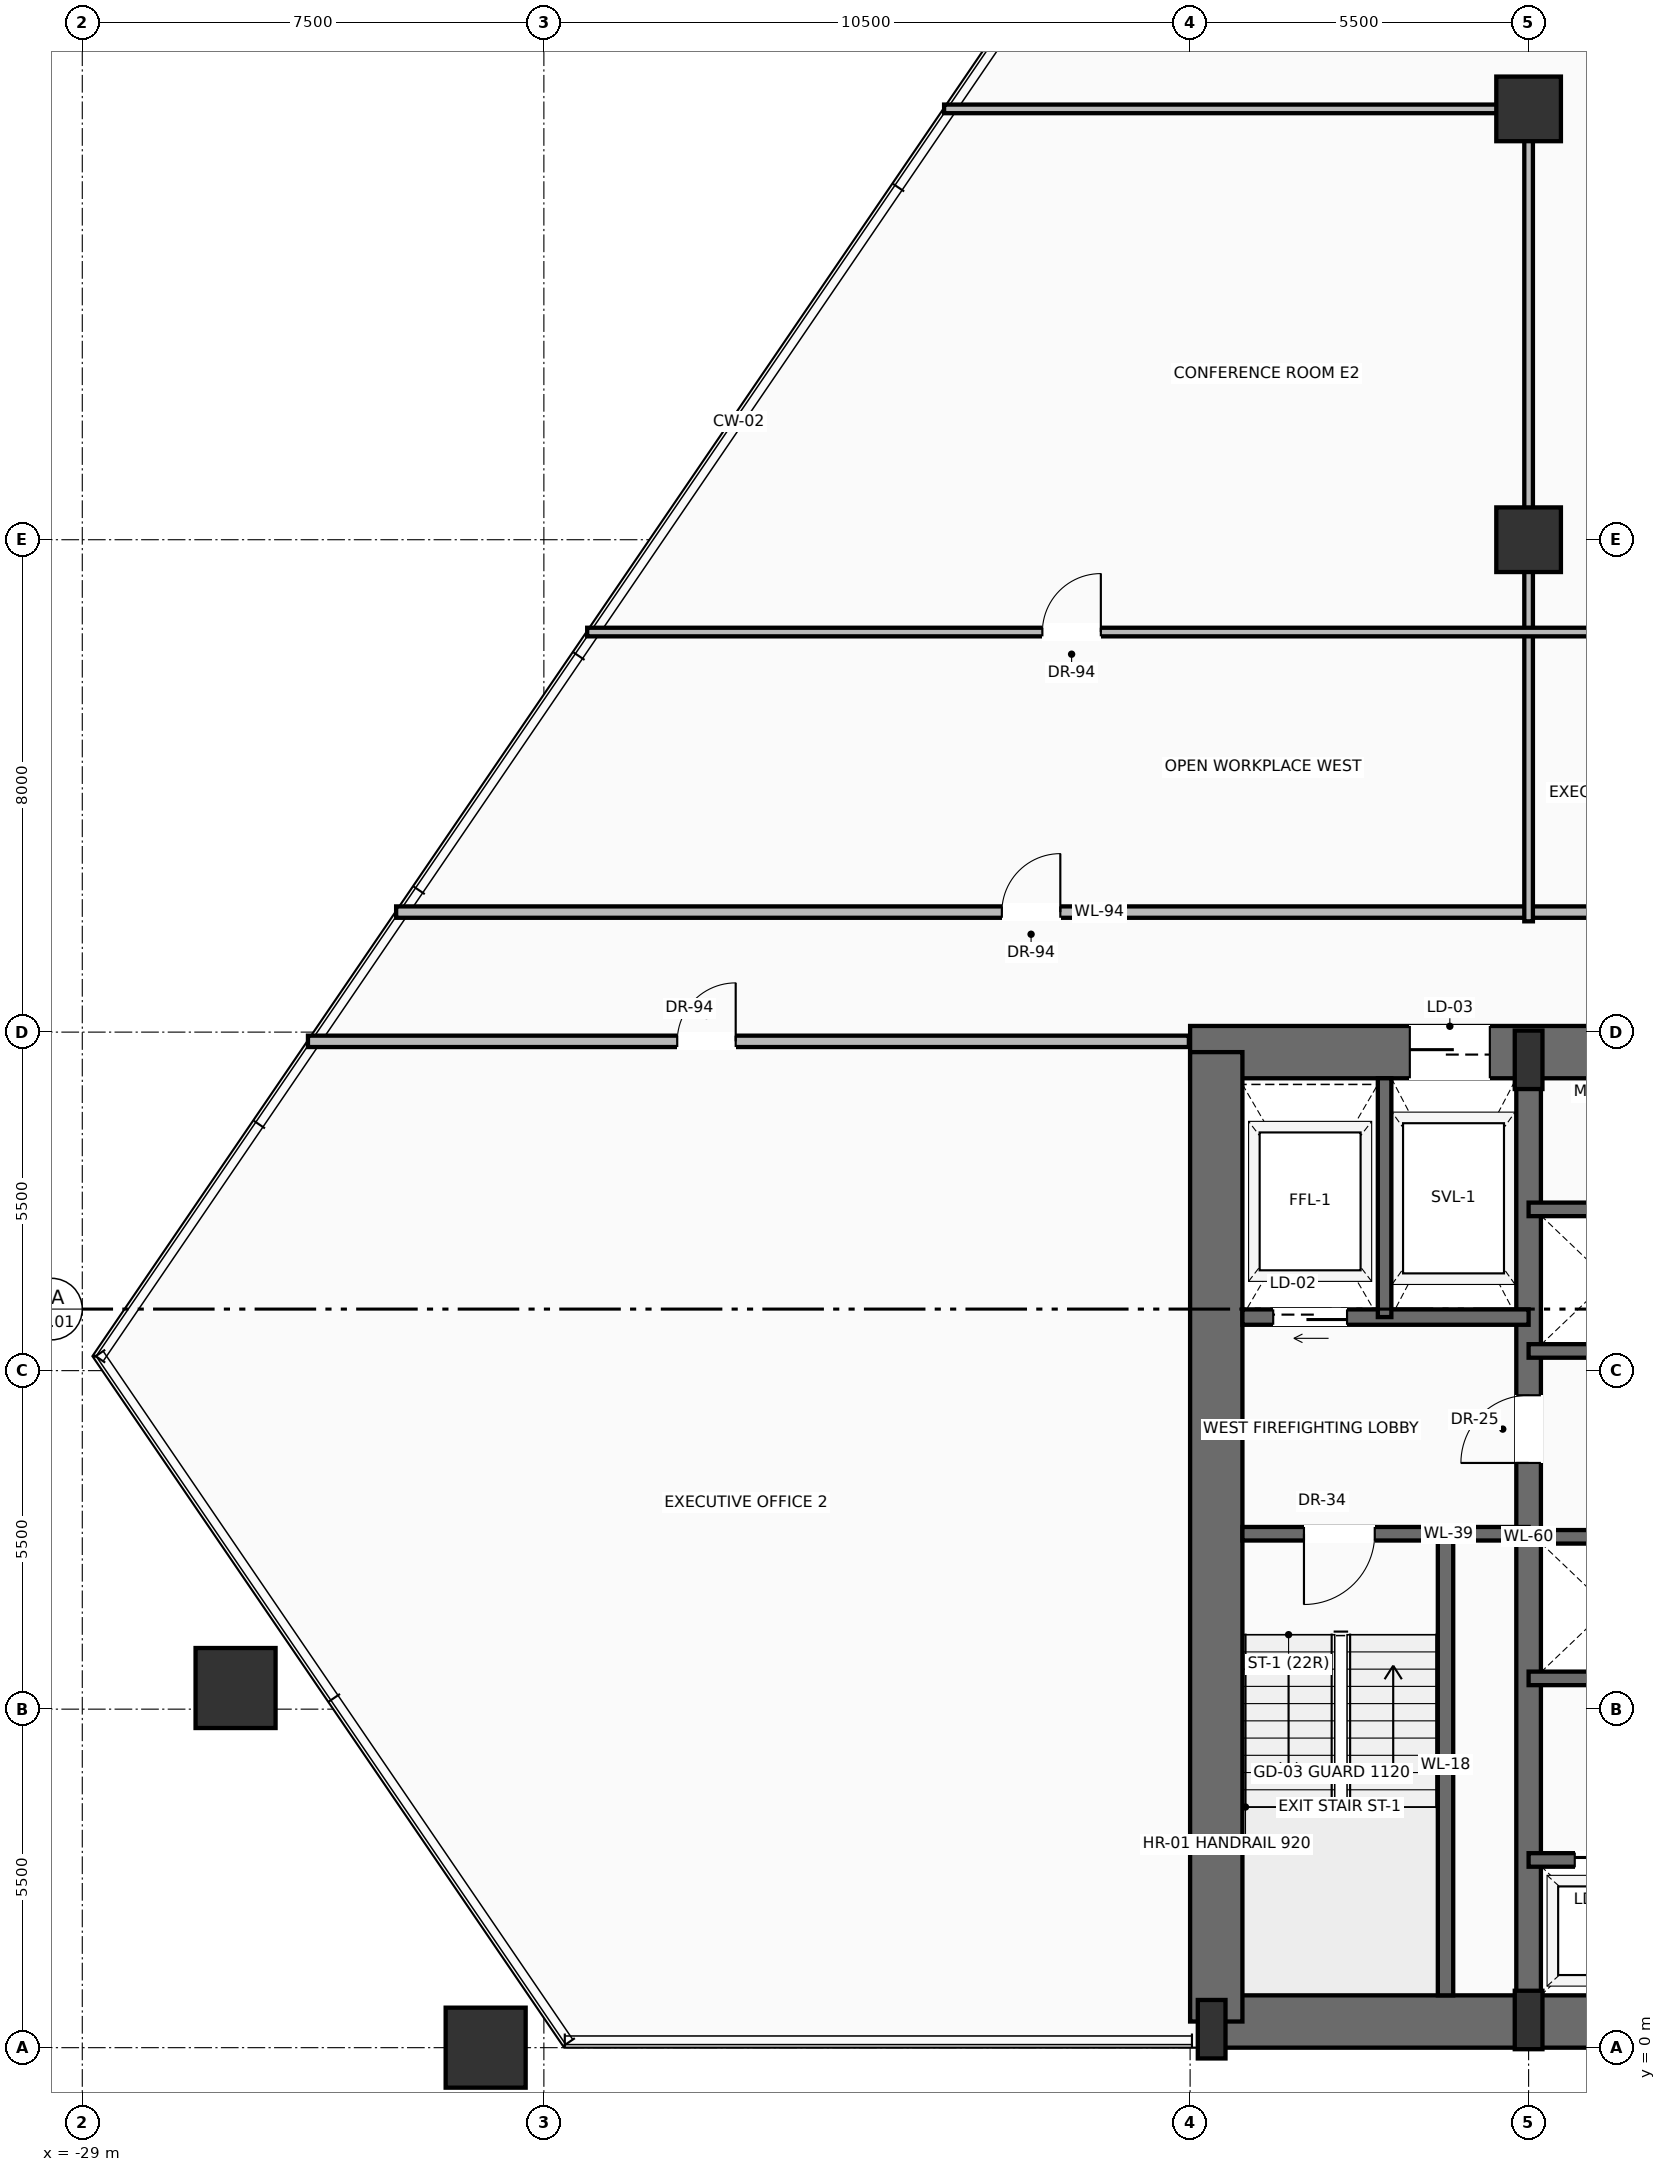
"""IFC4 building model, lengths in metres.
Left out: names, types, materials, properties, quantities, classifications, styles, units other than length and angle.
Written with IfcOpenShell. Run it as: python <this file> out.ifc"""

import sys

from ifc_helpers import new_model, si_unit, direction, frame, frame_2d, origin, origin_2d, place, context, subcontext, project, spatial, rectangle, hollow_rectangle, extrude, source, transform, mapped, element, fill, save


model = new_model("IFC4")
c1 = context("Model", 3, precision=1e-05, world=origin(), true_north=direction((0.0, 1.0)))
c2 = subcontext(c1, "Body", "Model", "MODEL_VIEW")
j1 = project(units=[si_unit("LENGTHUNIT", "METRE"), si_unit("PLANEANGLEUNIT", "RADIAN")], contexts=[c1])
p1 = place(None, origin())
s1 = spatial("IfcSite", under=j1, at=p1, CompositionType="ELEMENT")
p2 = place(p1, origin())
s2 = spatial("IfcBuilding", under=s1, at=p2, CompositionType="ELEMENT")
p3 = place(p2, frame((0.0, 0.0, 27.5)))
s3 = spatial("IfcBuildingStorey", under=s2, at=p3, CompositionType="ELEMENT", Elevation=27.5)
p4 = place(p3, frame((-10.65, 0.425, 0.0), z_axis=(0.0, 0.0, 1.0), x_axis=(1.0, 0.0, 0.0)))
e1 = element("IfcWall", 1, at=p4, inside=s3, PredefinedType="SHEAR", context=c2, shape_type="SweptSolid", body=[
    extrude(rectangle(XDim=21.3, YDim=0.85, at=frame_2d((10.65, 0.0))), origin(), (0.0, 0.0, 1.0), 3.45),
])
p5 = place(p3, frame((-11.0, 16.175, 0.0), z_axis=(0.0, 0.0, 1.0), x_axis=(1.0, 0.0, 0.0)))
e2 = element("IfcWall", 2, at=p5, inside=s3, PredefinedType="SHEAR", context=c2, shape_type="SweptSolid", body=[
    extrude(rectangle(XDim=22.0, YDim=0.85, at=frame_2d((11.0, 0.0))), origin(), (0.0, 0.0, 1.0), 3.45),
])
p6 = place(p5, frame((3.57, 0.0, 0.0)))
e3 = element("IfcOpeningElement", 3, at=p6, cuts=e2, PredefinedType="OPENING", context=c2, shape_type="SweptSolid", body=[
    extrude(rectangle(XDim=1.3, YDim=2.3, at=frame_2d((0.65, 1.15))), frame((0.0, 0.435, 0.0), z_axis=(0.0, -1.0, 0.0), x_axis=(1.0, 0.0, 0.0)), (0.0, 0.0, 1.0), 0.87),
])
p7 = place(p5, frame((10.0, 0.0, 0.0)))
e4 = element("IfcOpeningElement", 4, at=p7, cuts=e2, PredefinedType="OPENING", context=c2, shape_type="SweptSolid", body=[
    extrude(rectangle(XDim=2.0, YDim=2.4, at=frame_2d((1.0, 1.2))), frame((0.0, 0.435, 0.0), z_axis=(0.0, -1.0, 0.0), x_axis=(1.0, 0.0, 0.0)), (0.0, 0.0, 1.0), 0.87),
])
p8 = place(p3, frame((-10.575, 0.425, 0.0), z_axis=(0.0, 0.0, 1.0), x_axis=(0.0, 1.0, 0.0)))
e5 = element("IfcWall", 5, at=p8, inside=s3, PredefinedType="SHEAR", context=c2, shape_type="SweptSolid", body=[
    extrude(rectangle(XDim=15.75, YDim=0.85, at=frame_2d((7.875, 0.0))), origin(), (0.0, 0.0, 1.0), 3.45),
])
p9 = place(p3, frame((-5.5, 0.425, 0.0), z_axis=(0.0, 0.0, 1.0), x_axis=(0.0, 1.0, 0.0)))
e6 = element("IfcWall", 6, at=p9, inside=s3, PredefinedType="SHEAR", context=c2, shape_type="SweptSolid", body=[
    extrude(rectangle(XDim=15.75, YDim=0.4, at=frame_2d((7.875, 0.0))), origin(), (0.0, 0.0, 1.0), 3.45),
])
p10 = place(p9, frame((9.075, 0.0, 0.0)))
e7 = element("IfcOpeningElement", 7, at=p10, cuts=e6, PredefinedType="OPENING", context=c2, shape_type="SweptSolid", body=[
    extrude(rectangle(XDim=1.1, YDim=2.2, at=frame_2d((0.55, 1.1))), frame((0.0, 0.21, 0.0), z_axis=(0.0, -1.0, 0.0), x_axis=(1.0, 0.0, 0.0)), (0.0, 0.0, 1.0), 0.42),
])
m1 = source(origin(), c2, "Body", "SweptSolid", [
    extrude(rectangle(XDim=0.45, YDim=0.95, at=origin_2d()), origin(), (0.0, 0.0, 1.0), 3.7),
])
for number, where, z_axis, x_axis in (
    (8, (-10.65, 0.3, 0.0), (0.0, 0.0, 1.0), (1.0, 0.0, 0.0)),
    (9, (-5.5, 0.45, 0.0), (0.0, 0.0, 1.0), (1.0, 0.0, 0.0)),
    (10, (-5.5, 16.05, 0.0), (0.0, 0.0, 1.0), (1.0, 0.0, 0.0)),
):
    element("IfcColumn", number, at=place(p3, frame(where, z_axis=z_axis, x_axis=x_axis)), inside=s3, PredefinedType="PILASTER", context=c2, shape_type="MappedRepresentation", body=[
        mapped(m1, transform((0.0, 0.0, 0.0), scale=1.0)),
    ])
m2 = source(origin(), c2, "Body", "SweptSolid", [
    extrude(hollow_rectangle(XDim=1.3, YDim=1.3, WallThickness=0.065, at=origin_2d()), origin(), (0.0, 0.0, 1.0), 3.692),
])
for number, where, z_axis, x_axis in (
    (11, (-22.446, 0.0, 0.004), (-0.02, 0.0, 1.0), (0.0, -1.0, 0.0)),
    (12, (-26.51, 5.843, 0.004), (-0.004, -0.018, 1.0), (0.976, -0.216, 0.0)),
):
    element("IfcColumn", number, at=place(p3, frame(where, z_axis=z_axis, x_axis=x_axis)), inside=s3, PredefinedType="COLUMN", context=c2, shape_type="MappedRepresentation", body=[
        mapped(m2, transform((0.0, 0.0, 0.0), scale=1.0)),
    ])
m3 = source(origin(), c2, "Body", "SweptSolid", [
    extrude(rectangle(XDim=1.05, YDim=1.05, at=origin_2d()), origin(), (0.0, 0.0, 1.0), 3.7),
])
for number, where, z_axis, x_axis in (
    (13, (-5.5, 24.5, 0.0), (0.0, 0.0, 1.0), (1.0, 0.0, 0.0)),
    (14, (-5.5, 31.5, 0.0), (0.0, 0.0, 1.0), (1.0, 0.0, 0.0)),
):
    element("IfcColumn", number, at=place(p3, frame(where, z_axis=z_axis, x_axis=x_axis)), inside=s3, PredefinedType="COLUMN", context=c2, shape_type="MappedRepresentation", body=[
        mapped(m3, transform((0.0, 0.0, 0.0), scale=1.0)),
    ])
p11 = place(p3, frame((-6.85, 0.85, 0.0), z_axis=(0.0, 0.0, 1.0), x_axis=(0.0, 1.0, 0.0)))
e15 = element("IfcWall", 15, at=p11, inside=s3, PredefinedType="SOLIDWALL", context=c2, shape_type="SweptSolid", body=[
    extrude(rectangle(XDim=7.5, YDim=0.25, at=frame_2d((3.75, 0.0))), origin(), (0.0, 0.0, 1.0), 3.45),
])
p12 = place(p3, frame((-5.5, 8.35, 0.0), z_axis=(0.0, 0.0, 1.0), x_axis=(-1.0, 0.0, 0.0)))
e16 = element("IfcWall", 16, at=p12, inside=s3, PredefinedType="SOLIDWALL", context=c2, shape_type="SweptSolid", body=[
    extrude(rectangle(XDim=4.65, YDim=0.22, at=frame_2d((2.325, 0.0))), origin(), (0.0, 0.0, 1.0), 3.45),
])
p13 = place(p12, frame((2.5, 0.0, 0.0)))
e17 = element("IfcOpeningElement", 17, at=p13, cuts=e16, PredefinedType="OPENING", context=c2, shape_type="SweptSolid", body=[
    extrude(rectangle(XDim=1.15, YDim=2.2, at=frame_2d((0.575, 1.1))), frame((0.0, 0.12, 0.0), z_axis=(0.0, -1.0, 0.0), x_axis=(1.0, 0.0, 0.0)), (0.0, 0.0, 1.0), 0.24),
])
p14 = place(p3, frame((-5.5, 11.87, 0.0), z_axis=(0.0, 0.0, 1.0), x_axis=(-1.0, 0.0, 0.0)))
e18 = element("IfcWall", 18, at=p14, inside=s3, PredefinedType="SOLIDWALL", context=c2, shape_type="SweptSolid", body=[
    extrude(rectangle(XDim=4.65, YDim=0.25, at=frame_2d((2.325, 0.0))), origin(), (0.0, 0.0, 1.0), 3.45),
])
p15 = place(p14, frame((2.95, 0.0, 0.0)))
e19 = element("IfcOpeningElement", 19, at=p15, cuts=e18, PredefinedType="OPENING", context=c2, shape_type="SweptSolid", body=[
    extrude(rectangle(XDim=1.2, YDim=2.25, at=frame_2d((0.6, 1.125))), frame((0.0, 0.135, 0.0), z_axis=(0.0, -1.0, 0.0), x_axis=(1.0, 0.0, 0.0)), (0.0, 0.0, 1.0), 0.27),
])
p16 = place(p3, frame((-7.84, 11.87, 0.0), z_axis=(0.0, 0.0, 1.0), x_axis=(0.0, 1.0, 0.0)))
e20 = element("IfcWall", 20, at=p16, inside=s3, PredefinedType="SOLIDWALL", context=c2, shape_type="SweptSolid", body=[
    extrude(rectangle(XDim=3.88, YDim=0.22, at=frame_2d((1.94, 0.0))), origin(), (0.0, 0.0, 1.0), 3.45),
])
p17 = place(p3, frame((-5.5, 3.05, 0.0), z_axis=(0.0, 0.0, 1.0), x_axis=(1.0, 0.0, 0.0)))
e21 = element("IfcWall", 21, at=p17, inside=s3, PredefinedType="SOLIDWALL", context=c2, shape_type="SweptSolid", body=[
    extrude(rectangle(XDim=7.32, YDim=0.22, at=frame_2d((3.66, 0.0))), origin(), (0.0, 0.0, 1.0), 3.45),
])
p18 = place(p17, frame((0.75, 0.0, 0.0)))
e22 = element("IfcOpeningElement", 22, at=p18, cuts=e21, PredefinedType="OPENING", context=c2, shape_type="SweptSolid", body=[
    extrude(rectangle(XDim=1.1, YDim=2.2, at=frame_2d((0.55, 1.1))), frame((0.0, 0.12, 0.0), z_axis=(0.0, -1.0, 0.0), x_axis=(1.0, 0.0, 0.0)), (0.0, 0.0, 1.0), 0.24),
])
p19 = place(p17, frame((3.15, 0.0, 0.0)))
e23 = element("IfcOpeningElement", 23, at=p19, cuts=e21, PredefinedType="OPENING", context=c2, shape_type="SweptSolid", body=[
    extrude(rectangle(XDim=1.1, YDim=2.2, at=frame_2d((0.55, 1.1))), frame((0.0, 0.12, 0.0), z_axis=(0.0, -1.0, 0.0), x_axis=(1.0, 0.0, 0.0)), (0.0, 0.0, 1.0), 0.24),
])
p20 = place(p17, frame((5.55, 0.0, 0.0)))
e24 = element("IfcOpeningElement", 24, at=p20, cuts=e21, PredefinedType="OPENING", context=c2, shape_type="SweptSolid", body=[
    extrude(rectangle(XDim=1.1, YDim=2.2, at=frame_2d((0.55, 1.1))), frame((0.0, 0.12, 0.0), z_axis=(0.0, -1.0, 0.0), x_axis=(1.0, 0.0, 0.0)), (0.0, 0.0, 1.0), 0.24),
])
for number, where, z_axis, x_axis in (
    (25, (-5.5, 6.0, 0.0), (0.0, 0.0, 1.0), (1.0, 0.0, 0.0)),
    (26, (-5.5, 8.3, 0.0), (0.0, 0.0, 1.0), (1.0, 0.0, 0.0)),
    (27, (-5.5, 11.32, 0.0), (0.0, 0.0, 1.0), (1.0, 0.0, 0.0)),
    (28, (-5.5, 13.62, 0.0), (0.0, 0.0, 1.0), (1.0, 0.0, 0.0)),
):
    element("IfcWall", number, at=place(p3, frame(where, z_axis=z_axis, x_axis=x_axis)), inside=s3, PredefinedType="SOLIDWALL", context=c2, shape_type="SweptSolid", body=[
        extrude(rectangle(XDim=7.32, YDim=0.22, at=frame_2d((3.66, 0.0))), origin(), (0.0, 0.0, 1.0), 3.45),
    ])
p21 = place(p3, frame((-25.333, 16.35, 0.0), z_axis=(0.0, 0.0, 1.0), x_axis=(1.0, 0.0, 0.0)))
e29 = element("IfcWall", 29, at=p21, inside=s3, PredefinedType="PARTITIONING", context=c2, shape_type="SweptSolid", body=[
    extrude(rectangle(XDim=14.313, YDim=0.185, at=frame_2d((7.157, 0.0))), origin(), (0.0, 0.0, 1.0), 2.747),
])
p22 = place(p21, frame((6.0, 0.0, 0.0)))
e30 = element("IfcOpeningElement", 30, at=p22, cuts=e29, PredefinedType="OPENING", context=c2, shape_type="SweptSolid", body=[
    extrude(rectangle(XDim=0.95, YDim=2.2, at=frame_2d((0.475, 1.1))), frame((0.0, 0.103, 0.0), z_axis=(0.0, -1.0, 0.0), x_axis=(1.0, 0.0, 0.0)), (0.0, 0.0, 1.0), 0.205),
])
p23 = place(p3, frame((-23.9, 18.45, 0.0), z_axis=(0.0, 0.0, 1.0), x_axis=(1.0, 0.0, 0.0)))
e31 = element("IfcWall", 31, at=p23, inside=s3, PredefinedType="PARTITIONING", context=c2, shape_type="SweptSolid", body=[
    extrude(rectangle(XDim=22.85, YDim=0.185, at=frame_2d((11.425, 0.0))), origin(), (0.0, 0.0, 1.0), 2.747),
])
p24 = place(p23, frame((9.842, 0.0, 0.0)))
e32 = element("IfcOpeningElement", 32, at=p24, cuts=e31, PredefinedType="OPENING", context=c2, shape_type="SweptSolid", body=[
    extrude(rectangle(XDim=0.95, YDim=2.2, at=frame_2d((0.475, 1.1))), frame((0.0, 0.103, 0.0), z_axis=(0.0, -1.0, 0.0), x_axis=(1.0, 0.0, 0.0)), (0.0, 0.0, 1.0), 0.205),
])
p25 = place(p3, frame((-5.5, 18.3, 0.0), z_axis=(0.0, 0.0, 1.0), x_axis=(0.0, 1.0, 0.0)))
e33 = element("IfcWall", 33, at=p25, inside=s3, PredefinedType="PARTITIONING", context=c2, shape_type="SweptSolid", body=[
    extrude(rectangle(XDim=13.2, YDim=0.14, at=frame_2d((6.6, 0.0))), origin(), (0.0, 0.0, 1.0), 2.747),
])
p26 = place(p3, frame((-14.997, 31.5, 0.0), z_axis=(0.0, 0.0, 1.0), x_axis=(1.0, 0.0, 0.0)))
e34 = element("IfcWall", 34, at=p26, inside=s3, PredefinedType="PARTITIONING", context=c2, shape_type="SweptSolid", body=[
    extrude(rectangle(XDim=9.497, YDim=0.14, at=frame_2d((4.749, 0.0))), origin(), (0.0, 0.0, 1.0), 2.747),
])
p27 = place(p3, frame((-20.796, 23.0, 0.0), z_axis=(0.0, 0.0, 1.0), x_axis=(1.0, 0.0, 0.0)))
e35 = element("IfcWall", 35, at=p27, inside=s3, PredefinedType="PARTITIONING", context=c2, shape_type="SweptSolid", body=[
    extrude(rectangle(XDim=19.746, YDim=0.14, at=frame_2d((9.873, 0.0))), origin(), (0.0, 0.0, 1.0), 2.747),
])
p28 = place(p27, frame((7.396, 0.0, 0.0)))
e36 = element("IfcOpeningElement", 36, at=p28, cuts=e35, PredefinedType="OPENING", context=c2, shape_type="SweptSolid", body=[
    extrude(rectangle(XDim=0.95, YDim=2.2, at=frame_2d((0.475, 1.1))), frame((0.0, 0.08, 0.0), z_axis=(0.0, -1.0, 0.0), x_axis=(1.0, 0.0, 0.0)), (0.0, 0.0, 1.0), 0.16),
])
m4 = source(origin(), c2, "Body", "SweptSolid", [
    extrude(rectangle(XDim=1.15, YDim=2.2, at=frame_2d((0.575, 1.1))), frame((0.0, 0.025, 0.0), z_axis=(0.0, -1.0, 0.0), x_axis=(1.0, 0.0, 0.0)), (0.0, 0.0, 1.0), 0.05),
])
p29 = place(p13, origin())
e37 = element("IfcDoor", 37, at=p29, inside=s3, OperationType="SINGLE_SWING_RIGHT", PredefinedType="DOOR", context=c2, shape_type="MappedRepresentation", body=[
    mapped(m4, transform((0.0, 0.0, 0.0), scale=1.0)),
])
fill(e17, e37)
m5 = source(origin(), c2, "Body", "SweptSolid", [
    extrude(rectangle(XDim=1.1, YDim=2.2, at=frame_2d((0.55, 1.1))), frame((0.0, 0.025, 0.0), z_axis=(0.0, -1.0, 0.0), x_axis=(1.0, 0.0, 0.0)), (0.0, 0.0, 1.0), 0.05),
])
p30 = place(p10, origin())
e38 = element("IfcDoor", 38, at=p30, inside=s3, OperationType="SINGLE_SWING_LEFT", PredefinedType="DOOR", context=c2, shape_type="MappedRepresentation", body=[
    mapped(m5, transform((0.0, 0.0, 0.0), scale=1.0)),
])
fill(e7, e38)
m6 = source(origin(), c2, "Body", "SweptSolid", [
    extrude(rectangle(XDim=1.2, YDim=2.25, at=frame_2d((0.6, 1.125))), frame((0.0, 0.025, 0.0), z_axis=(0.0, -1.0, 0.0), x_axis=(1.0, 0.0, 0.0)), (0.0, 0.0, 1.0), 0.05),
])
p31 = place(p15, origin())
e39 = element("IfcDoor", 39, at=p31, inside=s3, OperationType="SLIDING_TO_LEFT", PredefinedType="DOOR", context=c2, shape_type="MappedRepresentation", body=[
    mapped(m6, transform((0.0, 0.0, 0.0), scale=1.0)),
])
fill(e19, e39)
m7 = source(origin(), c2, "Body", "SweptSolid", [
    extrude(rectangle(XDim=1.3, YDim=2.3, at=frame_2d((0.65, 1.15))), frame((0.0, 0.025, 0.0), z_axis=(0.0, -1.0, 0.0), x_axis=(1.0, 0.0, 0.0)), (0.0, 0.0, 1.0), 0.05),
])
p32 = place(p6, origin())
e40 = element("IfcDoor", 40, at=p32, inside=s3, OperationType="SLIDING_TO_RIGHT", PredefinedType="DOOR", context=c2, shape_type="MappedRepresentation", body=[
    mapped(m7, transform((0.0, 0.0, 0.0), scale=1.0)),
])
fill(e3, e40)
m8 = source(origin(), c2, "Body", "SweptSolid", [
    extrude(rectangle(XDim=1.1, YDim=2.2, at=frame_2d((0.55, 1.1))), frame((0.0, 0.025, 0.0), z_axis=(0.0, -1.0, 0.0), x_axis=(1.0, 0.0, 0.0)), (0.0, 0.0, 1.0), 0.05),
])
p33 = place(p18, origin())
e41 = element("IfcDoor", 41, at=p33, inside=s3, OperationType="SLIDING_TO_RIGHT", PredefinedType="DOOR", context=c2, shape_type="MappedRepresentation", body=[
    mapped(m8, transform((0.0, 0.0, 0.0), scale=1.0)),
])
fill(e22, e41)
m9 = source(origin(), c2, "Body", "SweptSolid", [
    extrude(rectangle(XDim=0.95, YDim=2.2, at=frame_2d((0.475, 1.1))), frame((0.0, 0.025, 0.0), z_axis=(0.0, -1.0, 0.0), x_axis=(1.0, 0.0, 0.0)), (0.0, 0.0, 1.0), 0.05),
])
p34 = place(p22, origin())
e42 = element("IfcDoor", 42, at=p34, inside=s3, OperationType="SINGLE_SWING_RIGHT", PredefinedType="DOOR", context=c2, shape_type="MappedRepresentation", body=[
    mapped(m9, transform((0.0, 0.0, 0.0), scale=1.0)),
])
fill(e30, e42)
p35 = place(p24, origin())
e43 = element("IfcDoor", 43, at=p35, inside=s3, OperationType="SINGLE_SWING_RIGHT", PredefinedType="DOOR", context=c2, shape_type="MappedRepresentation", body=[
    mapped(m9, transform((0.0, 0.0, 0.0), scale=1.0)),
])
fill(e32, e43)
p36 = place(p28, origin())
e44 = element("IfcDoor", 44, at=p36, inside=s3, OperationType="SINGLE_SWING_RIGHT", PredefinedType="DOOR", context=c2, shape_type="MappedRepresentation", body=[
    mapped(m9, transform((0.0, 0.0, 0.0), scale=1.0)),
])
fill(e36, e44)
save(model, sys.argv[1])
